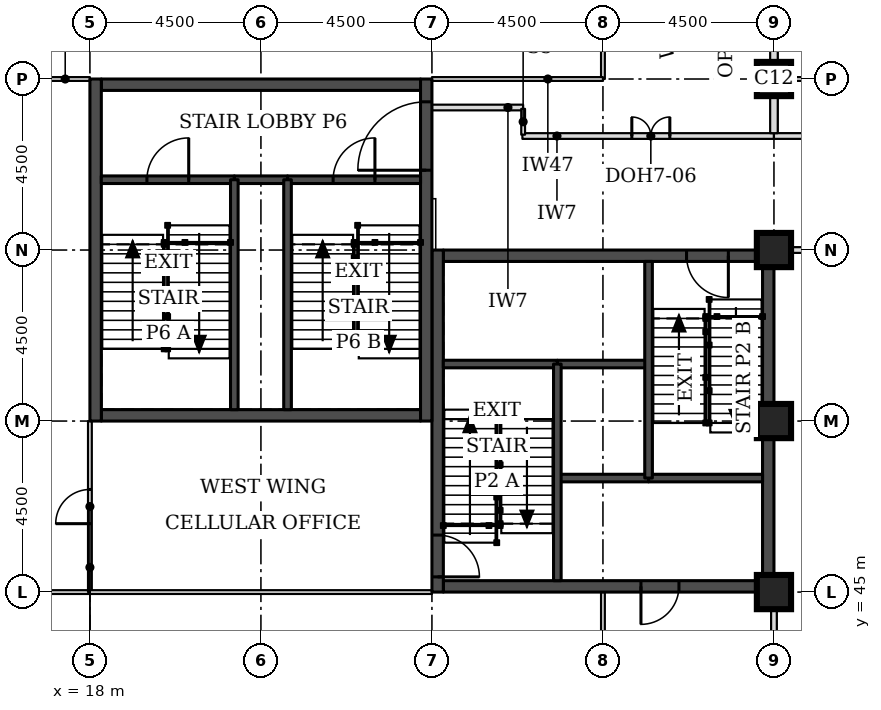
"""IFC4 building model, lengths in metres.
Left out: names, types, materials, properties, quantities, classifications, styles, units other than length and angle.
Written with IfcOpenShell. Run it as: python <this file> out.ifc"""

import sys

from ifc_helpers import new_model, si_unit, direction, frame, frame_2d, origin, origin_2d, place, context, subcontext, project, spatial, rectangle, extrude, element, fill, save


model = new_model("IFC4")
c1 = context("Model", 3, precision=1e-05, world=origin(), true_north=direction((0.0, 1.0)))
c2 = subcontext(c1, "Body", "Model", "MODEL_VIEW")
j1 = project(units=[si_unit("LENGTHUNIT", "METRE"), si_unit("PLANEANGLEUNIT", "RADIAN")], contexts=[c1])
p1 = place(None, origin())
s1 = spatial("IfcSite", under=j1, at=p1, CompositionType="ELEMENT")
p2 = place(p1, origin())
s2 = spatial("IfcBuilding", under=s1, at=p2, CompositionType="ELEMENT")
p3 = place(p2, frame((0.0, 0.0, 192.1)))
s3 = spatial("IfcBuildingStorey", under=s2, at=p3, CompositionType="ELEMENT", Elevation=192.1)
for number, where, z_axis, x_axis in (
    (1, (36.0, 45.0, 0.0), (0.0, 0.0, 1.0), (1.0, 0.0, 0.0)),
    (2, (36.0, 49.5, 0.0), (0.0, 0.0, 1.0), (1.0, 0.0, 0.0)),
    (3, (36.0, 54.0, 0.0), (0.0, 0.0, 1.0), (1.0, 0.0, 0.0)),
    (4, (36.0, 58.5, 0.0), (0.0, 0.0, 1.0), (1.0, 0.0, 0.0)),
):
    element("IfcColumn", number, at=place(p3, frame(where, z_axis=z_axis, x_axis=x_axis)), inside=s3, PredefinedType="COLUMN", context=c2, shape_type="SweptSolid", body=[
        extrude(rectangle(XDim=0.9, YDim=0.9, at=origin_2d()), origin(), (0.0, 0.0, 1.0), 3.7),
    ])
p4 = place(p3, frame((27.3, 45.15, 0.0), z_axis=(0.0, 0.0, 1.0), x_axis=(1.0, 0.0, 0.0)))
e5 = element("IfcWall", 5, at=p4, inside=s3, PredefinedType="SHEAR", context=c2, shape_type="SweptSolid", body=[
    extrude(rectangle(XDim=8.4, YDim=0.3, at=frame_2d((4.2, 0.0))), origin(), (0.0, 0.0, 1.0), 3.7),
])
p5 = place(p4, frame((5.2, 0.0, 0.0)))
e6 = element("IfcOpeningElement", 6, at=p5, cuts=e5, PredefinedType="OPENING", context=c2, shape_type="SweptSolid", body=[
    extrude(rectangle(XDim=1.0, YDim=2.1, at=frame_2d((0.5, 1.05))), frame((0.0, 0.16, 0.0), z_axis=(0.0, -1.0, 0.0), x_axis=(1.0, 0.0, 0.0)), (0.0, 0.0, 1.0), 0.32),
])
p6 = place(p3, frame((27.3, 53.85, 0.0), z_axis=(0.0, 0.0, 1.0), x_axis=(1.0, 0.0, 0.0)))
e7 = element("IfcWall", 7, at=p6, inside=s3, PredefinedType="SHEAR", context=c2, shape_type="SweptSolid", body=[
    extrude(rectangle(XDim=8.4, YDim=0.3, at=frame_2d((4.2, 0.0))), origin(), (0.0, 0.0, 1.0), 3.7),
])
p7 = place(p6, frame((6.4, 0.0, 0.0)))
e8 = element("IfcOpeningElement", 8, at=p7, cuts=e7, PredefinedType="OPENING", context=c2, shape_type="SweptSolid", body=[
    extrude(rectangle(XDim=1.1, YDim=2.1, at=frame_2d((0.55, 1.05))), frame((0.0, 0.16, 0.0), z_axis=(0.0, -1.0, 0.0), x_axis=(1.0, 0.0, 0.0)), (0.0, 0.0, 1.0), 0.32),
])
p8 = place(p3, frame((27.15, 45.0, 0.0), z_axis=(0.0, 0.0, 1.0), x_axis=(0.0, 1.0, 0.0)))
e9 = element("IfcWall", 9, at=p8, inside=s3, PredefinedType="SHEAR", context=c2, shape_type="SweptSolid", body=[
    extrude(rectangle(XDim=9.0, YDim=0.3, at=frame_2d((4.5, 0.0))), origin(), (0.0, 0.0, 1.0), 3.7),
])
p9 = place(p8, frame((0.4, 0.0, 0.0)))
e10 = element("IfcOpeningElement", 10, at=p9, cuts=e9, PredefinedType="OPENING", context=c2, shape_type="SweptSolid", body=[
    extrude(rectangle(XDim=1.1, YDim=2.1, at=frame_2d((0.55, 1.05))), frame((0.0, 0.16, 0.0), z_axis=(0.0, -1.0, 0.0), x_axis=(1.0, 0.0, 0.0)), (0.0, 0.0, 1.0), 0.32),
])
p10 = place(p3, frame((35.85, 45.0, 0.0), z_axis=(0.0, 0.0, 1.0), x_axis=(0.0, 1.0, 0.0)))
e11 = element("IfcWall", 11, at=p10, inside=s3, PredefinedType="SHEAR", context=c2, shape_type="SweptSolid", body=[
    extrude(rectangle(XDim=9.0, YDim=0.3, at=frame_2d((4.5, 0.0))), origin(), (0.0, 0.0, 1.0), 3.7),
])
for number, where, z_axis, x_axis in (
    (12, (18.3, 49.65, 0.0), (0.0, 0.0, 1.0), (1.0, 0.0, 0.0)),
    (13, (18.3, 58.35, 0.0), (0.0, 0.0, 1.0), (1.0, 0.0, 0.0)),
):
    element("IfcWall", number, at=place(p3, frame(where, z_axis=z_axis, x_axis=x_axis)), inside=s3, PredefinedType="SHEAR", context=c2, shape_type="SweptSolid", body=[
        extrude(rectangle(XDim=8.4, YDim=0.3, at=frame_2d((4.2, 0.0))), origin(), (0.0, 0.0, 1.0), 3.7),
    ])
p11 = place(p3, frame((18.15, 49.5, 0.0), z_axis=(0.0, 0.0, 1.0), x_axis=(0.0, 1.0, 0.0)))
e14 = element("IfcWall", 14, at=p11, inside=s3, PredefinedType="SHEAR", context=c2, shape_type="SweptSolid", body=[
    extrude(rectangle(XDim=9.0, YDim=0.3, at=frame_2d((4.5, 0.0))), origin(), (0.0, 0.0, 1.0), 3.7),
])
p12 = place(p3, frame((26.85, 49.5, 0.0), z_axis=(0.0, 0.0, 1.0), x_axis=(0.0, 1.0, 0.0)))
e15 = element("IfcWall", 15, at=p12, inside=s3, PredefinedType="SHEAR", context=c2, shape_type="SweptSolid", body=[
    extrude(rectangle(XDim=9.0, YDim=0.3, at=frame_2d((4.5, 0.0))), origin(), (0.0, 0.0, 1.0), 3.7),
])
p13 = place(p12, frame((6.6, 0.0, 0.0)))
e16 = element("IfcOpeningElement", 16, at=p13, cuts=e15, PredefinedType="OPENING", context=c2, shape_type="SweptSolid", body=[
    extrude(rectangle(XDim=1.8, YDim=2.1, at=frame_2d((0.9, 1.05))), frame((0.0, 0.16, 0.0), z_axis=(0.0, -1.0, 0.0), x_axis=(1.0, 0.0, 0.0)), (0.0, 0.0, 1.0), 0.32),
])
p14 = place(p3, frame((17.792, 63.676, 0.0), z_axis=(0.0, 0.0, 1.0), x_axis=(-0.707106781187, -0.707106781187, 0.0)))
e17 = element("IfcWall", 17, at=p14, inside=s3, PredefinedType="STANDARD", context=c2, shape_type="SweptSolid", body=[
    extrude(rectangle(XDim=7.027, YDim=0.35, at=frame_2d((3.513, 0.0))), origin(), (0.0, 0.0, 1.0), 3.525),
])
p15 = place(p14, frame((1.863, 0.0, 0.9)))
e18 = element("IfcOpeningElement", 18, at=p15, cuts=e17, PredefinedType="OPENING", context=c2, shape_type="SweptSolid", body=[
    extrude(rectangle(XDim=3.3, YDim=1.9, at=frame_2d((1.65, 0.95))), frame((0.0, 0.185, 0.0), z_axis=(0.0, -1.0, 0.0), x_axis=(1.0, 0.0, 0.0)), (0.0, 0.0, 1.0), 0.37),
])
p16 = place(p3, frame((12.824, 44.792, 0.0), z_axis=(0.0, 0.0, 1.0), x_axis=(0.707106781187, -0.707106781187, 0.0)))
e19 = element("IfcWall", 19, at=p16, inside=s3, PredefinedType="STANDARD", context=c2, shape_type="SweptSolid", body=[
    extrude(rectangle(XDim=7.027, YDim=0.35, at=frame_2d((3.513, 0.0))), origin(), (0.0, 0.0, 1.0), 3.525),
])
p17 = place(p16, frame((1.863, 0.0, 0.9)))
e20 = element("IfcOpeningElement", 20, at=p17, cuts=e19, PredefinedType="OPENING", context=c2, shape_type="SweptSolid", body=[
    extrude(rectangle(XDim=3.3, YDim=1.9, at=frame_2d((1.65, 0.95))), frame((0.0, 0.185, 0.0), z_axis=(0.0, -1.0, 0.0), x_axis=(1.0, 0.0, 0.0)), (0.0, 0.0, 1.0), 0.37),
])
p18 = place(p3, frame((36.45, 54.0, 0.0), z_axis=(0.0, 0.0, 1.0), x_axis=(1.0, 0.0, 0.0)))
e21 = element("IfcWall", 21, at=p18, inside=s3, PredefinedType="PARTITIONING", context=c2, shape_type="SweptSolid", body=[
    extrude(rectangle(XDim=5.625, YDim=0.15, at=frame_2d((2.812, 0.0))), origin(), (0.0, 0.0, 1.0), 3.55),
])
p19 = place(p3, frame((29.38, 57.0, 0.0), z_axis=(0.0, 0.0, 1.0), x_axis=(1.0, 0.0, 0.0)))
e22 = element("IfcWall", 22, at=p19, inside=s3, PredefinedType="PARTITIONING", context=c2, shape_type="SweptSolid", body=[
    extrude(rectangle(XDim=6.62, YDim=0.15, at=frame_2d((3.31, 0.0))), origin(), (0.0, 0.0, 1.0), 3.55),
])
p20 = place(p19, frame((2.88, 0.0, 0.0)))
e23 = element("IfcOpeningElement", 23, at=p20, cuts=e22, PredefinedType="OPENING", context=c2, shape_type="SweptSolid", body=[
    extrude(rectangle(XDim=1.0, YDim=2.1, at=frame_2d((0.5, 1.05))), frame((0.0, 0.085, 0.0), z_axis=(0.0, -1.0, 0.0), x_axis=(1.0, 0.0, 0.0)), (0.0, 0.0, 1.0), 0.17),
])
p21 = place(p3, frame((36.0, 57.0, 0.0), z_axis=(0.0, 0.0, 1.0), x_axis=(1.0, 0.0, 0.0)))
e24 = element("IfcWall", 24, at=p21, inside=s3, PredefinedType="PARTITIONING", context=c2, shape_type="SweptSolid", body=[
    extrude(rectangle(XDim=6.075, YDim=0.15, at=frame_2d((3.038, 0.0))), origin(), (0.0, 0.0, 1.0), 3.55),
])
p22 = place(p3, frame((36.45, 58.5, 0.0), z_axis=(0.0, 0.0, 1.0), x_axis=(1.0, 0.0, 0.0)))
e25 = element("IfcWall", 25, at=p22, inside=s3, PredefinedType="PARTITIONING", context=c2, shape_type="SweptSolid", body=[
    extrude(rectangle(XDim=2.6, YDim=0.1, at=frame_2d((1.3, 0.0))), origin(), (0.0, 0.0, 1.0), 3.55),
])
p23 = place(p22, frame((0.85, 0.0, 0.0)))
e26 = element("IfcOpeningElement", 26, at=p23, cuts=e25, PredefinedType="OPENING", context=c2, shape_type="SweptSolid", body=[
    extrude(rectangle(XDim=0.9, YDim=2.1, at=frame_2d((0.45, 1.05))), frame((0.0, 0.06, 0.0), z_axis=(0.0, -1.0, 0.0), x_axis=(1.0, 0.0, 0.0)), (0.0, 0.0, 1.0), 0.12),
])
p24 = place(p3, frame((36.0, 40.95, 0.0), z_axis=(0.0, 0.0, 1.0), x_axis=(0.0, 1.0, 0.0)))
e27 = element("IfcWall", 27, at=p24, inside=s3, PredefinedType="PARTITIONING", context=c2, shape_type="SweptSolid", body=[
    extrude(rectangle(XDim=3.63, YDim=0.15, at=frame_2d((1.815, 0.0))), origin(), (0.0, 0.0, 1.0), 2.8),
])
p25 = place(p24, frame((1.4, 0.0, 0.0)))
e28 = element("IfcOpeningElement", 28, at=p25, cuts=e27, PredefinedType="OPENING", context=c2, shape_type="SweptSolid", body=[
    extrude(rectangle(XDim=0.9, YDim=2.1, at=frame_2d((0.45, 1.05))), frame((0.0, 0.085, 0.0), z_axis=(0.0, -1.0, 0.0), x_axis=(1.0, 0.0, 0.0)), (0.0, 0.0, 1.0), 0.17),
])
p26 = place(p3, frame((36.0, 57.075, 0.0), z_axis=(0.0, 0.0, 1.0), x_axis=(0.0, 1.0, 0.0)))
e29 = element("IfcWall", 29, at=p26, inside=s3, PredefinedType="PARTITIONING", context=c2, shape_type="SweptSolid", body=[
    extrude(rectangle(XDim=0.975, YDim=0.2, at=frame_2d((0.488, 0.0))), origin(), (0.0, 0.0, 1.0), 2.8),
])
p27 = place(p3, frame((36.0, 58.92, 0.0), z_axis=(0.0, 0.0, 1.0), x_axis=(0.0, 1.0, 0.0)))
e30 = element("IfcWall", 30, at=p27, inside=s3, PredefinedType="PARTITIONING", context=c2, shape_type="SweptSolid", body=[
    extrude(rectangle(XDim=3.63, YDim=0.2, at=frame_2d((1.815, 0.0))), origin(), (0.0, 0.0, 1.0), 2.8),
])
p28 = place(p3, frame((31.5, 63.0, 0.0), z_axis=(0.0, 0.0, 1.0), x_axis=(0.0, -1.0, 0.0)))
e31 = element("IfcWall", 31, at=p28, inside=s3, PredefinedType="PARTITIONING", context=c2, shape_type="SweptSolid", body=[
    extrude(rectangle(XDim=4.5, YDim=0.1, at=frame_2d((2.25, 0.0))), origin(), (0.0, 0.0, 1.0), 3.55),
])
p29 = place(p28, frame((1.8, 0.0, 0.0)))
e32 = element("IfcOpeningElement", 32, at=p29, cuts=e31, PredefinedType="OPENING", context=c2, shape_type="SweptSolid", body=[
    extrude(rectangle(XDim=0.9, YDim=2.1, at=frame_2d((0.45, 1.05))), frame((0.0, 0.06, 0.0), z_axis=(0.0, -1.0, 0.0), x_axis=(1.0, 0.0, 0.0)), (0.0, 0.0, 1.0), 0.12),
])
p30 = place(p3, frame((31.5, 58.5, 0.0), z_axis=(0.0, 0.0, 1.0), x_axis=(-1.0, 0.0, 0.0)))
e33 = element("IfcWall", 33, at=p30, inside=s3, PredefinedType="PARTITIONING", context=c2, shape_type="SweptSolid", body=[
    extrude(rectangle(XDim=4.5, YDim=0.1, at=frame_2d((2.25, 0.0))), origin(), (0.0, 0.0, 1.0), 2.55),
])
p31 = place(p3, frame((13.5, 58.5, 0.0), z_axis=(0.0, 0.0, 1.0), x_axis=(1.0, 0.0, 0.0)))
e34 = element("IfcWall", 34, at=p31, inside=s3, PredefinedType="PARTITIONING", context=c2, shape_type="SweptSolid", body=[
    extrude(rectangle(XDim=4.5, YDim=0.1, at=frame_2d((2.25, 0.0))), origin(), (0.0, 0.0, 1.0), 2.55),
])
p32 = place(p31, frame((1.8, 0.0, 0.0)))
e35 = element("IfcOpeningElement", 35, at=p32, cuts=e34, PredefinedType="OPENING", context=c2, shape_type="SweptSolid", body=[
    extrude(rectangle(XDim=0.9, YDim=2.1, at=frame_2d((0.45, 1.05))), frame((0.0, 0.06, 0.0), z_axis=(0.0, -1.0, 0.0), x_axis=(1.0, 0.0, 0.0)), (0.0, 0.0, 1.0), 0.12),
])
p33 = place(p3, frame((18.0, 45.0, 0.0), z_axis=(0.0, 0.0, 1.0), x_axis=(-1.0, 0.0, 0.0)))
e36 = element("IfcWall", 36, at=p33, inside=s3, PredefinedType="PARTITIONING", context=c2, shape_type="SweptSolid", body=[
    extrude(rectangle(XDim=4.5, YDim=0.1, at=frame_2d((2.25, 0.0))), origin(), (0.0, 0.0, 1.0), 2.55),
])
p34 = place(p33, frame((1.8, 0.0, 0.0)))
e37 = element("IfcOpeningElement", 37, at=p34, cuts=e36, PredefinedType="OPENING", context=c2, shape_type="SweptSolid", body=[
    extrude(rectangle(XDim=0.9, YDim=2.1, at=frame_2d((0.45, 1.05))), frame((0.0, 0.06, 0.0), z_axis=(0.0, -1.0, 0.0), x_axis=(1.0, 0.0, 0.0)), (0.0, 0.0, 1.0), 0.12),
])
p35 = place(p3, frame((18.0, 49.5, 0.0), z_axis=(0.0, 0.0, 1.0), x_axis=(0.0, -1.0, 0.0)))
e38 = element("IfcWall", 38, at=p35, inside=s3, PredefinedType="PARTITIONING", context=c2, shape_type="SweptSolid", body=[
    extrude(rectangle(XDim=4.5, YDim=0.1, at=frame_2d((2.25, 0.0))), origin(), (0.0, 0.0, 1.0), 3.55),
])
p36 = place(p35, frame((1.8, 0.0, 0.0)))
e39 = element("IfcOpeningElement", 39, at=p36, cuts=e38, PredefinedType="OPENING", context=c2, shape_type="SweptSolid", body=[
    extrude(rectangle(XDim=0.9, YDim=2.1, at=frame_2d((0.45, 1.05))), frame((0.0, 0.06, 0.0), z_axis=(0.0, -1.0, 0.0), x_axis=(1.0, 0.0, 0.0)), (0.0, 0.0, 1.0), 0.12),
])
p37 = place(p3, frame((18.0, 45.0, 0.0), z_axis=(0.0, 0.0, 1.0), x_axis=(1.0, 0.0, 0.0)))
e40 = element("IfcWall", 40, at=p37, inside=s3, PredefinedType="PARTITIONING", context=c2, shape_type="SweptSolid", body=[
    extrude(rectangle(XDim=9.0, YDim=0.1, at=frame_2d((4.5, 0.0))), origin(), (0.0, 0.0, 1.0), 2.55),
])
p38 = place(p3, frame((31.5, 45.0, 0.0), z_axis=(0.0, 0.0, 1.0), x_axis=(0.0, -1.0, 0.0)))
e41 = element("IfcWall", 41, at=p38, inside=s3, PredefinedType="PARTITIONING", context=c2, shape_type="SweptSolid", body=[
    extrude(rectangle(XDim=4.5, YDim=0.1, at=frame_2d((2.25, 0.0))), origin(), (0.0, 0.0, 1.0), 3.55),
])
p39 = place(p38, frame((1.8, 0.0, 0.0)))
e42 = element("IfcOpeningElement", 42, at=p39, cuts=e41, PredefinedType="OPENING", context=c2, shape_type="SweptSolid", body=[
    extrude(rectangle(XDim=0.9, YDim=2.1, at=frame_2d((0.45, 1.05))), frame((0.0, 0.06, 0.0), z_axis=(0.0, -1.0, 0.0), x_axis=(1.0, 0.0, 0.0)), (0.0, 0.0, 1.0), 0.12),
])
p40 = place(p3, frame((27.0, 57.75, 0.0), z_axis=(0.0, 0.0, 1.0), x_axis=(1.0, 0.0, 0.0)))
e43 = element("IfcWall", 43, at=p40, inside=s3, PredefinedType="PARTITIONING", context=c2, shape_type="SweptSolid", body=[
    extrude(rectangle(XDim=2.4, YDim=0.15, at=frame_2d((1.2, 0.0))), origin(), (0.0, 0.0, 1.0), 3.55),
])
p41 = place(p3, frame((29.4, 57.715, 0.0), z_axis=(0.0, 0.0, 1.0), x_axis=(0.0, -1.0, 0.0)))
e44 = element("IfcWall", 44, at=p41, inside=s3, PredefinedType="PARTITIONING", context=c2, shape_type="SweptSolid", body=[
    extrude(rectangle(XDim=0.68, YDim=0.1, at=frame_2d((0.34, 0.0))), origin(), (0.0, 0.0, 1.0), 3.55),
])
p42 = place(p3, frame((30.3, 48.0, 0.0), z_axis=(0.0, 0.0, 1.0), x_axis=(1.0, 0.0, 0.0)))
e45 = element("IfcWall", 45, at=p42, inside=s3, PredefinedType="SOLIDWALL", context=c2, shape_type="SweptSolid", body=[
    extrude(rectangle(XDim=2.4, YDim=0.2, at=frame_2d((1.2, 0.0))), origin(), (0.0, 0.0, 1.0), 3.55),
])
p43 = place(p3, frame((32.7, 48.0, 0.0), z_axis=(0.0, 0.0, 1.0), x_axis=(1.0, 0.0, 0.0)))
e46 = element("IfcWall", 46, at=p43, inside=s3, PredefinedType="SOLIDWALL", context=c2, shape_type="SweptSolid", body=[
    extrude(rectangle(XDim=3.0, YDim=0.2, at=frame_2d((1.5, 0.0))), origin(), (0.0, 0.0, 1.0), 3.55),
])
p44 = place(p3, frame((30.3, 51.0, 0.0), z_axis=(0.0, 0.0, 1.0), x_axis=(1.0, 0.0, 0.0)))
e47 = element("IfcWall", 47, at=p44, inside=s3, PredefinedType="SOLIDWALL", context=c2, shape_type="SweptSolid", body=[
    extrude(rectangle(XDim=2.4, YDim=0.2, at=frame_2d((1.2, 0.0))), origin(), (0.0, 0.0, 1.0), 3.7),
])
p45 = place(p3, frame((27.3, 51.0, 0.0), z_axis=(0.0, 0.0, 1.0), x_axis=(1.0, 0.0, 0.0)))
e48 = element("IfcWall", 48, at=p45, inside=s3, PredefinedType="SOLIDWALL", context=c2, shape_type="SweptSolid", body=[
    extrude(rectangle(XDim=3.0, YDim=0.2, at=frame_2d((1.5, 0.0))), origin(), (0.0, 0.0, 1.0), 3.55),
])
for number, where, z_axis, x_axis in (
    (49, (30.3, 45.3, 0.0), (0.0, 0.0, 1.0), (0.0, 1.0, 0.0)),
    (50, (32.7, 48.0, 0.0), (0.0, 0.0, 1.0), (0.0, 1.0, 0.0)),
):
    element("IfcWall", number, at=place(p3, frame(where, z_axis=z_axis, x_axis=x_axis)), inside=s3, PredefinedType="SOLIDWALL", context=c2, shape_type="SweptSolid", body=[
        extrude(rectangle(XDim=5.7, YDim=0.2, at=frame_2d((2.85, 0.0))), origin(), (0.0, 0.0, 1.0), 3.55),
    ])
p46 = place(p3, frame((21.8, 55.85, 0.0), z_axis=(0.0, 0.0, 1.0), x_axis=(1.0, 0.0, 0.0)))
e51 = element("IfcWall", 51, at=p46, inside=s3, PredefinedType="SOLIDWALL", context=c2, shape_type="SweptSolid", body=[
    extrude(rectangle(XDim=1.4, YDim=0.2, at=frame_2d((0.7, 0.0))), origin(), (0.0, 0.0, 1.0), 3.55),
])
p47 = place(p3, frame((18.3, 55.85, 0.0), z_axis=(0.0, 0.0, 1.0), x_axis=(1.0, 0.0, 0.0)))
e52 = element("IfcWall", 52, at=p47, inside=s3, PredefinedType="SOLIDWALL", context=c2, shape_type="SweptSolid", body=[
    extrude(rectangle(XDim=3.5, YDim=0.2, at=frame_2d((1.75, 0.0))), origin(), (0.0, 0.0, 1.0), 3.55),
])
p48 = place(p47, frame((1.2, 0.0, 0.0)))
e53 = element("IfcOpeningElement", 53, at=p48, cuts=e52, PredefinedType="OPENING", context=c2, shape_type="SweptSolid", body=[
    extrude(rectangle(XDim=1.1, YDim=2.1, at=frame_2d((0.55, 1.05))), frame((0.0, 0.11, 0.0), z_axis=(0.0, -1.0, 0.0), x_axis=(1.0, 0.0, 0.0)), (0.0, 0.0, 1.0), 0.22),
])
p49 = place(p3, frame((23.2, 55.85, 0.0), z_axis=(0.0, 0.0, 1.0), x_axis=(1.0, 0.0, 0.0)))
e54 = element("IfcWall", 54, at=p49, inside=s3, PredefinedType="SOLIDWALL", context=c2, shape_type="SweptSolid", body=[
    extrude(rectangle(XDim=3.5, YDim=0.2, at=frame_2d((1.75, 0.0))), origin(), (0.0, 0.0, 1.0), 3.55),
])
p50 = place(p49, frame((1.2, 0.0, 0.0)))
e55 = element("IfcOpeningElement", 55, at=p50, cuts=e54, PredefinedType="OPENING", context=c2, shape_type="SweptSolid", body=[
    extrude(rectangle(XDim=1.1, YDim=2.1, at=frame_2d((0.55, 1.05))), frame((0.0, 0.11, 0.0), z_axis=(0.0, -1.0, 0.0), x_axis=(1.0, 0.0, 0.0)), (0.0, 0.0, 1.0), 0.22),
])
for number, where, z_axis, x_axis in (
    (56, (21.8, 49.8, 0.0), (0.0, 0.0, 1.0), (0.0, 1.0, 0.0)),
    (57, (23.2, 49.8, 0.0), (0.0, 0.0, 1.0), (0.0, 1.0, 0.0)),
):
    element("IfcWall", number, at=place(p3, frame(where, z_axis=z_axis, x_axis=x_axis)), inside=s3, PredefinedType="SOLIDWALL", context=c2, shape_type="SweptSolid", body=[
        extrude(rectangle(XDim=6.05, YDim=0.2, at=frame_2d((3.025, 0.0))), origin(), (0.0, 0.0, 1.0), 3.55),
    ])
p51 = place(p20, origin())
e58 = element("IfcDoor", 58, at=p51, inside=s3, OperationType="DOUBLE_DOOR_SINGLE_SWING", PredefinedType="DOOR", context=c2, shape_type="SweptSolid", body=[
    extrude(rectangle(XDim=1.0, YDim=2.1, at=frame_2d((0.5, 1.05))), frame((0.0, 0.025, 0.0), z_axis=(0.0, -1.0, 0.0), x_axis=(1.0, 0.0, 0.0)), (0.0, 0.0, 1.0), 0.05),
])
fill(e23, e58)
p52 = place(p36, frame((0.9, 0.0, 0.0), z_axis=(0.0, 0.0, 1.0), x_axis=(-1.0, 0.0, 0.0)))
e59 = element("IfcDoor", 59, at=p52, inside=s3, OperationType="SINGLE_SWING_LEFT", PredefinedType="DOOR", context=c2, shape_type="SweptSolid", body=[
    extrude(rectangle(XDim=0.9, YDim=2.1, at=frame_2d((0.45, 1.05))), frame((0.0, 0.025, 0.0), z_axis=(0.0, -1.0, 0.0), x_axis=(1.0, 0.0, 0.0)), (0.0, 0.0, 1.0), 0.05),
])
fill(e39, e59)
p53 = place(p9, frame((1.1, 0.0, 0.0), z_axis=(0.0, 0.0, 1.0), x_axis=(-1.0, 0.0, 0.0)))
e60 = element("IfcDoor", 60, at=p53, inside=s3, OperationType="SINGLE_SWING_RIGHT", PredefinedType="DOOR", context=c2, shape_type="SweptSolid", body=[
    extrude(rectangle(XDim=1.1, YDim=2.1, at=frame_2d((0.55, 1.05))), frame((0.0, 0.025, 0.0), z_axis=(0.0, -1.0, 0.0), x_axis=(1.0, 0.0, 0.0)), (0.0, 0.0, 1.0), 0.05),
])
fill(e10, e60)
p54 = place(p7, frame((1.1, 0.0, 0.0), z_axis=(0.0, 0.0, 1.0), x_axis=(-1.0, 0.0, 0.0)))
e61 = element("IfcDoor", 61, at=p54, inside=s3, OperationType="SINGLE_SWING_LEFT", PredefinedType="DOOR", context=c2, shape_type="SweptSolid", body=[
    extrude(rectangle(XDim=1.1, YDim=2.1, at=frame_2d((0.55, 1.05))), frame((0.0, 0.025, 0.0), z_axis=(0.0, -1.0, 0.0), x_axis=(1.0, 0.0, 0.0)), (0.0, 0.0, 1.0), 0.05),
])
fill(e8, e61)
p55 = place(p5, frame((1.0, 0.0, 0.0), z_axis=(0.0, 0.0, 1.0), x_axis=(-1.0, 0.0, 0.0)))
e62 = element("IfcDoor", 62, at=p55, inside=s3, OperationType="SINGLE_SWING_RIGHT", PredefinedType="DOOR", context=c2, shape_type="SweptSolid", body=[
    extrude(rectangle(XDim=1.0, YDim=2.1, at=frame_2d((0.5, 1.05))), frame((0.0, 0.025, 0.0), z_axis=(0.0, -1.0, 0.0), x_axis=(1.0, 0.0, 0.0)), (0.0, 0.0, 1.0), 0.05),
])
fill(e6, e62)
p56 = place(p48, origin())
e63 = element("IfcDoor", 63, at=p56, inside=s3, OperationType="SINGLE_SWING_RIGHT", PredefinedType="DOOR", context=c2, shape_type="SweptSolid", body=[
    extrude(rectangle(XDim=1.1, YDim=2.1, at=frame_2d((0.55, 1.05))), frame((0.0, 0.025, 0.0), z_axis=(0.0, -1.0, 0.0), x_axis=(1.0, 0.0, 0.0)), (0.0, 0.0, 1.0), 0.05),
])
fill(e53, e63)
p57 = place(p50, origin())
e64 = element("IfcDoor", 64, at=p57, inside=s3, OperationType="SINGLE_SWING_RIGHT", PredefinedType="DOOR", context=c2, shape_type="SweptSolid", body=[
    extrude(rectangle(XDim=1.1, YDim=2.1, at=frame_2d((0.55, 1.05))), frame((0.0, 0.025, 0.0), z_axis=(0.0, -1.0, 0.0), x_axis=(1.0, 0.0, 0.0)), (0.0, 0.0, 1.0), 0.05),
])
fill(e55, e64)
p58 = place(p13, origin())
e65 = element("IfcDoor", 65, at=p58, inside=s3, OperationType="SINGLE_SWING_LEFT", PredefinedType="DOOR", context=c2, shape_type="SweptSolid", body=[
    extrude(rectangle(XDim=1.8, YDim=2.1, at=frame_2d((0.9, 1.05))), frame((0.0, 0.025, 0.0), z_axis=(0.0, -1.0, 0.0), x_axis=(1.0, 0.0, 0.0)), (0.0, 0.0, 1.0), 0.05),
])
fill(e16, e65)
save(model, sys.argv[1])
